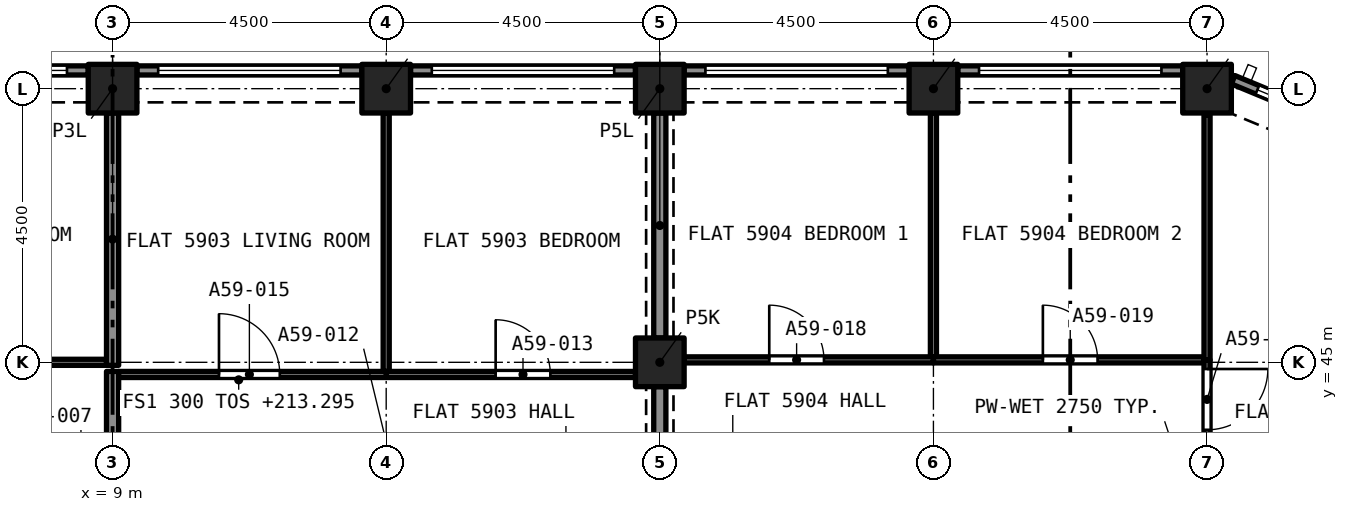
"""IFC4 building model, lengths in metres.
Left out: names, types, materials, properties, quantities, classifications, styles, units other than length and angle.
Written with IfcOpenShell. Run it as: python <this file> out.ifc"""

import sys

from ifc_helpers import new_model, si_unit, direction, frame, frame_2d, origin, origin_2d, place, context, subcontext, project, spatial, rectangle, extrude, element, fill, save


model = new_model("IFC4")
c1 = context("Model", 3, precision=1e-05, world=origin(), true_north=direction((0.0, 1.0)))
c2 = subcontext(c1, "Body", "Model", "MODEL_VIEW")
j1 = project(units=[si_unit("LENGTHUNIT", "METRE"), si_unit("PLANEANGLEUNIT", "RADIAN")], contexts=[c1])
p1 = place(None, origin())
s1 = spatial("IfcSite", under=j1, at=p1, CompositionType="ELEMENT")
p2 = place(p1, origin())
s2 = spatial("IfcBuilding", under=s1, at=p2, CompositionType="ELEMENT")
p3 = place(p2, frame((0.0, 0.0, 213.295)))
s3 = spatial("IfcBuildingStorey", under=s2, at=p3, CompositionType="ELEMENT", Elevation=213.295)
for number, where, z_axis, x_axis in (
    (1, (18.0, 45.0, 0.0), (0.0, 0.0, 1.0), (1.0, 0.0, 0.0)),
    (2, (9.0, 49.5, 0.0), (0.0, 0.0, 1.0), (1.0, 0.0, 0.0)),
    (3, (13.5, 49.5, 0.0), (0.0, 0.0, 1.0), (1.0, 0.0, 0.0)),
    (4, (18.0, 49.5, 0.0), (0.0, 0.0, 1.0), (1.0, 0.0, 0.0)),
    (5, (22.5, 49.5, 0.0), (0.0, 0.0, 1.0), (1.0, 0.0, 0.0)),
    (6, (27.0, 49.5, 0.0), (0.0, 0.0, 1.0), (1.0, 0.0, 0.0)),
):
    element("IfcColumn", number, at=place(p3, frame(where, z_axis=z_axis, x_axis=x_axis)), inside=s3, PredefinedType="COLUMN", context=c2, shape_type="SweptSolid", body=[
        extrude(rectangle(XDim=0.8, YDim=0.8, at=origin_2d()), origin(), (0.0, 0.0, 1.0), 3.2),
    ])
p4 = place(p3, frame((27.429, 49.647, 0.0), z_axis=(0.0, 0.0, 1.0), x_axis=(0.923885342263, -0.382669406082, 0.0)))
e7 = element("IfcWall", 7, at=p4, inside=s3, PredefinedType="SOLIDWALL", context=c2, shape_type="SweptSolid", body=[
    extrude(rectangle(XDim=2.602, YDim=0.15, at=frame_2d((1.301, 0.0))), origin(), (0.0, 0.0, 1.0), 3.2),
])
p5 = place(p4, frame((0.432, 0.0, 0.45)))
e8 = element("IfcOpeningElement", 8, at=p5, cuts=e7, PredefinedType="OPENING", context=c2, shape_type="SweptSolid", body=[
    extrude(rectangle(XDim=1.9, YDim=1.95, at=frame_2d((0.95, 0.975))), frame((0.0, 0.085, 0.0), z_axis=(0.0, -1.0, 0.0), x_axis=(1.0, 0.0, 0.0)), (0.0, 0.0, 1.0), 0.17),
])
p6 = place(p3, frame((22.9, 49.8, 0.0), z_axis=(0.0, 0.0, 1.0), x_axis=(1.0, 0.0, 0.0)))
e9 = element("IfcWall", 9, at=p6, inside=s3, PredefinedType="SOLIDWALL", context=c2, shape_type="SweptSolid", body=[
    extrude(rectangle(XDim=3.7, YDim=0.15, at=frame_2d((1.85, 0.0))), origin(), (0.0, 0.0, 1.0), 3.2),
])
p7 = place(p6, frame((0.35, 0.0, 0.45)))
e10 = element("IfcOpeningElement", 10, at=p7, cuts=e9, PredefinedType="OPENING", context=c2, shape_type="SweptSolid", body=[
    extrude(rectangle(XDim=3.0, YDim=1.95, at=frame_2d((1.5, 0.975))), frame((0.0, 0.085, 0.0), z_axis=(0.0, -1.0, 0.0), x_axis=(1.0, 0.0, 0.0)), (0.0, 0.0, 1.0), 0.17),
])
p8 = place(p3, frame((18.4, 49.8, 0.0), z_axis=(0.0, 0.0, 1.0), x_axis=(1.0, 0.0, 0.0)))
e11 = element("IfcWall", 11, at=p8, inside=s3, PredefinedType="SOLIDWALL", context=c2, shape_type="SweptSolid", body=[
    extrude(rectangle(XDim=3.7, YDim=0.15, at=frame_2d((1.85, 0.0))), origin(), (0.0, 0.0, 1.0), 3.2),
])
p9 = place(p8, frame((0.35, 0.0, 0.45)))
e12 = element("IfcOpeningElement", 12, at=p9, cuts=e11, PredefinedType="OPENING", context=c2, shape_type="SweptSolid", body=[
    extrude(rectangle(XDim=3.0, YDim=1.95, at=frame_2d((1.5, 0.975))), frame((0.0, 0.085, 0.0), z_axis=(0.0, -1.0, 0.0), x_axis=(1.0, 0.0, 0.0)), (0.0, 0.0, 1.0), 0.17),
])
p10 = place(p3, frame((13.9, 49.8, 0.0), z_axis=(0.0, 0.0, 1.0), x_axis=(1.0, 0.0, 0.0)))
e13 = element("IfcWall", 13, at=p10, inside=s3, PredefinedType="SOLIDWALL", context=c2, shape_type="SweptSolid", body=[
    extrude(rectangle(XDim=3.7, YDim=0.15, at=frame_2d((1.85, 0.0))), origin(), (0.0, 0.0, 1.0), 3.2),
])
p11 = place(p10, frame((0.35, 0.0, 0.45)))
e14 = element("IfcOpeningElement", 14, at=p11, cuts=e13, PredefinedType="OPENING", context=c2, shape_type="SweptSolid", body=[
    extrude(rectangle(XDim=3.0, YDim=1.95, at=frame_2d((1.5, 0.975))), frame((0.0, 0.085, 0.0), z_axis=(0.0, -1.0, 0.0), x_axis=(1.0, 0.0, 0.0)), (0.0, 0.0, 1.0), 0.17),
])
p12 = place(p3, frame((9.4, 49.8, 0.0), z_axis=(0.0, 0.0, 1.0), x_axis=(1.0, 0.0, 0.0)))
e15 = element("IfcWall", 15, at=p12, inside=s3, PredefinedType="SOLIDWALL", context=c2, shape_type="SweptSolid", body=[
    extrude(rectangle(XDim=3.7, YDim=0.15, at=frame_2d((1.85, 0.0))), origin(), (0.0, 0.0, 1.0), 3.2),
])
p13 = place(p12, frame((0.35, 0.0, 0.45)))
e16 = element("IfcOpeningElement", 16, at=p13, cuts=e15, PredefinedType="OPENING", context=c2, shape_type="SweptSolid", body=[
    extrude(rectangle(XDim=3.0, YDim=1.95, at=frame_2d((1.5, 0.975))), frame((0.0, 0.085, 0.0), z_axis=(0.0, -1.0, 0.0), x_axis=(1.0, 0.0, 0.0)), (0.0, 0.0, 1.0), 0.17),
])
p14 = place(p3, frame((4.9, 49.8, 0.0), z_axis=(0.0, 0.0, 1.0), x_axis=(1.0, 0.0, 0.0)))
e17 = element("IfcWall", 17, at=p14, inside=s3, PredefinedType="SOLIDWALL", context=c2, shape_type="SweptSolid", body=[
    extrude(rectangle(XDim=3.7, YDim=0.15, at=frame_2d((1.85, 0.0))), origin(), (0.0, 0.0, 1.0), 3.2),
])
p15 = place(p14, frame((0.35, 0.0, 0.45)))
e18 = element("IfcOpeningElement", 18, at=p15, cuts=e17, PredefinedType="OPENING", context=c2, shape_type="SweptSolid", body=[
    extrude(rectangle(XDim=3.0, YDim=1.95, at=frame_2d((1.5, 0.975))), frame((0.0, 0.085, 0.0), z_axis=(0.0, -1.0, 0.0), x_axis=(1.0, 0.0, 0.0)), (0.0, 0.0, 1.0), 0.17),
])
p16 = place(p3, frame((4.5, 45.0, 0.0), z_axis=(0.0, 0.0, 1.0), x_axis=(1.0, 0.0, 0.0)))
e19 = element("IfcWall", 19, at=p16, inside=s3, PredefinedType="PARTITIONING", context=c2, shape_type="SweptSolid", body=[
    extrude(rectangle(XDim=4.4, YDim=0.1, at=frame_2d((2.2, 0.0))), origin(), (0.0, 0.0, 1.0), 2.9),
])
p17 = place(p16, frame((1.8, 0.0, 0.0)))
e20 = element("IfcOpeningElement", 20, at=p17, cuts=e19, PredefinedType="OPENING", context=c2, shape_type="SweptSolid", body=[
    extrude(rectangle(XDim=0.9, YDim=2.1, at=frame_2d((0.45, 1.05))), frame((0.0, 0.06, 0.0), z_axis=(0.0, -1.0, 0.0), x_axis=(1.0, 0.0, 0.0)), (0.0, 0.0, 1.0), 0.12),
])
p18 = place(p3, frame((9.0, 44.95, 0.0), z_axis=(0.0, 0.0, 1.0), x_axis=(0.0, 1.0, 0.0)))
e21 = element("IfcWall", 21, at=p18, inside=s3, PredefinedType="PARTITIONING", context=c2, shape_type="SweptSolid", body=[
    extrude(rectangle(XDim=4.15, YDim=0.2, at=frame_2d((2.075, 0.0))), origin(), (0.0, 0.0, 1.0), 2.9),
])
p19 = place(p3, frame((9.0, 43.62, 0.0), z_axis=(0.0, 0.0, 1.0), x_axis=(0.0, 1.0, 0.0)))
e22 = element("IfcWall", 22, at=p19, inside=s3, PredefinedType="PARTITIONING", context=c2, shape_type="SweptSolid", body=[
    extrude(rectangle(XDim=1.23, YDim=0.2, at=frame_2d((0.615, 0.0))), origin(), (0.0, 0.0, 1.0), 2.9),
])
p20 = place(p3, frame((13.5, 44.8, 0.0), z_axis=(0.0, 0.0, 1.0), x_axis=(1.0, 0.0, 0.0)))
e23 = element("IfcWall", 23, at=p20, inside=s3, PredefinedType="PARTITIONING", context=c2, shape_type="SweptSolid", body=[
    extrude(rectangle(XDim=4.1, YDim=0.1, at=frame_2d((2.05, 0.0))), origin(), (0.0, 0.0, 1.0), 2.9),
])
p21 = place(p20, frame((1.8, 0.0, 0.0)))
e24 = element("IfcOpeningElement", 24, at=p21, cuts=e23, PredefinedType="OPENING", context=c2, shape_type="SweptSolid", body=[
    extrude(rectangle(XDim=0.9, YDim=2.1, at=frame_2d((0.45, 1.05))), frame((0.0, 0.06, 0.0), z_axis=(0.0, -1.0, 0.0), x_axis=(1.0, 0.0, 0.0)), (0.0, 0.0, 1.0), 0.12),
])
p22 = place(p3, frame((13.5, 44.85, 0.0), z_axis=(0.0, 0.0, 1.0), x_axis=(0.0, 1.0, 0.0)))
e25 = element("IfcWall", 25, at=p22, inside=s3, PredefinedType="PARTITIONING", context=c2, shape_type="SweptSolid", body=[
    extrude(rectangle(XDim=4.25, YDim=0.1, at=frame_2d((2.125, 0.0))), origin(), (0.0, 0.0, 1.0), 2.9),
])
p23 = place(p3, frame((18.0, 45.4, 0.0), z_axis=(0.0, 0.0, 1.0), x_axis=(0.0, 1.0, 0.0)))
e26 = element("IfcWall", 26, at=p23, inside=s3, PredefinedType="PARTITIONING", context=c2, shape_type="SweptSolid", body=[
    extrude(rectangle(XDim=3.7, YDim=0.2, at=frame_2d((1.85, 0.0))), origin(), (0.0, 0.0, 1.0), 2.38),
])
p24 = place(p3, frame((9.1, 44.8, 0.0), z_axis=(0.0, 0.0, 1.0), x_axis=(1.0, 0.0, 0.0)))
e27 = element("IfcWall", 27, at=p24, inside=s3, PredefinedType="PARTITIONING", context=c2, shape_type="SweptSolid", body=[
    extrude(rectangle(XDim=4.4, YDim=0.1, at=frame_2d((2.2, 0.0))), origin(), (0.0, 0.0, 1.0), 2.9),
])
p25 = place(p24, frame((1.65, 0.0, 0.0)))
e28 = element("IfcOpeningElement", 28, at=p25, cuts=e27, PredefinedType="OPENING", context=c2, shape_type="SweptSolid", body=[
    extrude(rectangle(XDim=1.0, YDim=2.1, at=frame_2d((0.5, 1.05))), frame((0.0, 0.06, 0.0), z_axis=(0.0, -1.0, 0.0), x_axis=(1.0, 0.0, 0.0)), (0.0, 0.0, 1.0), 0.12),
])
p26 = place(p3, frame((18.0, 40.9, 0.0), z_axis=(0.0, 0.0, 1.0), x_axis=(0.0, 1.0, 0.0)))
e29 = element("IfcWall", 29, at=p26, inside=s3, PredefinedType="PARTITIONING", context=c2, shape_type="SweptSolid", body=[
    extrude(rectangle(XDim=3.7, YDim=0.2, at=frame_2d((1.85, 0.0))), origin(), (0.0, 0.0, 1.0), 2.38),
])
p27 = place(p3, frame((22.5, 45.09, 0.0), z_axis=(0.0, 0.0, 1.0), x_axis=(0.0, 1.0, 0.0)))
e30 = element("IfcWall", 30, at=p27, inside=s3, PredefinedType="PARTITIONING", context=c2, shape_type="SweptSolid", body=[
    extrude(rectangle(XDim=4.01, YDim=0.1, at=frame_2d((2.005, 0.0))), origin(), (0.0, 0.0, 1.0), 2.75),
])
p28 = place(p3, frame((18.4, 45.04, 0.0), z_axis=(0.0, 0.0, 1.0), x_axis=(1.0, 0.0, 0.0)))
e31 = element("IfcWall", 31, at=p28, inside=s3, PredefinedType="PARTITIONING", context=c2, shape_type="SweptSolid", body=[
    extrude(rectangle(XDim=4.1, YDim=0.1, at=frame_2d((2.05, 0.0))), origin(), (0.0, 0.0, 1.0), 2.75),
])
p29 = place(p28, frame((1.4, 0.0, 0.0)))
e32 = element("IfcOpeningElement", 32, at=p29, cuts=e31, PredefinedType="OPENING", context=c2, shape_type="SweptSolid", body=[
    extrude(rectangle(XDim=0.9, YDim=2.1, at=frame_2d((0.45, 1.05))), frame((0.0, 0.06, 0.0), z_axis=(0.0, -1.0, 0.0), x_axis=(1.0, 0.0, 0.0)), (0.0, 0.0, 1.0), 0.12),
])
p30 = place(p3, frame((22.5, 45.04, 0.0), z_axis=(0.0, 0.0, 1.0), x_axis=(1.0, 0.0, 0.0)))
e33 = element("IfcWall", 33, at=p30, inside=s3, PredefinedType="PARTITIONING", context=c2, shape_type="SweptSolid", body=[
    extrude(rectangle(XDim=4.45, YDim=0.1, at=frame_2d((2.225, 0.0))), origin(), (0.0, 0.0, 1.0), 2.75),
])
p31 = place(p30, frame((1.8, 0.0, 0.0)))
e34 = element("IfcOpeningElement", 34, at=p31, cuts=e33, PredefinedType="OPENING", context=c2, shape_type="SweptSolid", body=[
    extrude(rectangle(XDim=0.9, YDim=2.1, at=frame_2d((0.45, 1.05))), frame((0.0, 0.06, 0.0), z_axis=(0.0, -1.0, 0.0), x_axis=(1.0, 0.0, 0.0)), (0.0, 0.0, 1.0), 0.12),
])
p32 = place(p3, frame((27.0, 45.04, 0.0), z_axis=(0.0, 0.0, 1.0), x_axis=(0.0, 1.0, 0.0)))
e35 = element("IfcWall", 35, at=p32, inside=s3, PredefinedType="PARTITIONING", context=c2, shape_type="SweptSolid", body=[
    extrude(rectangle(XDim=4.027, YDim=0.1, at=frame_2d((2.014, 0.0))), origin(), (0.0, 0.0, 1.0), 2.75),
])
p33 = place(p3, frame((27.0, 45.04, 0.0), z_axis=(0.0, 0.0, 1.0), x_axis=(0.0, -1.0, 0.0)))
e36 = element("IfcWall", 36, at=p33, inside=s3, PredefinedType="PARTITIONING", context=c2, shape_type="SweptSolid", body=[
    extrude(rectangle(XDim=1.3, YDim=0.1, at=frame_2d((0.65, 0.0))), origin(), (0.0, 0.0, 1.0), 2.75),
])
p34 = place(p33, frame((0.15, 0.0, 0.0)))
e37 = element("IfcOpeningElement", 37, at=p34, cuts=e36, PredefinedType="OPENING", context=c2, shape_type="SweptSolid", body=[
    extrude(rectangle(XDim=1.0, YDim=2.1, at=frame_2d((0.5, 1.05))), frame((0.0, 0.06, 0.0), z_axis=(0.0, -1.0, 0.0), x_axis=(1.0, 0.0, 0.0)), (0.0, 0.0, 1.0), 0.12),
])
p35 = place(p5, origin())
e38 = element("IfcWindow", 38, at=p35, inside=s3, PartitioningType="SINGLE_PANEL", PredefinedType="WINDOW", context=c2, shape_type="SweptSolid", body=[
    extrude(rectangle(XDim=1.9, YDim=1.95, at=frame_2d((0.95, 0.975))), frame((0.0, 0.03, 0.0), z_axis=(0.0, -1.0, 0.0), x_axis=(1.0, 0.0, 0.0)), (0.0, 0.0, 1.0), 0.06),
])
fill(e8, e38)
p36 = place(p7, origin())
e39 = element("IfcWindow", 39, at=p36, inside=s3, PartitioningType="SINGLE_PANEL", PredefinedType="WINDOW", context=c2, shape_type="SweptSolid", body=[
    extrude(rectangle(XDim=3.0, YDim=1.95, at=frame_2d((1.5, 0.975))), frame((0.0, 0.03, 0.0), z_axis=(0.0, -1.0, 0.0), x_axis=(1.0, 0.0, 0.0)), (0.0, 0.0, 1.0), 0.06),
])
fill(e10, e39)
p37 = place(p9, origin())
e40 = element("IfcWindow", 40, at=p37, inside=s3, PartitioningType="SINGLE_PANEL", PredefinedType="WINDOW", context=c2, shape_type="SweptSolid", body=[
    extrude(rectangle(XDim=3.0, YDim=1.95, at=frame_2d((1.5, 0.975))), frame((0.0, 0.03, 0.0), z_axis=(0.0, -1.0, 0.0), x_axis=(1.0, 0.0, 0.0)), (0.0, 0.0, 1.0), 0.06),
])
fill(e12, e40)
p38 = place(p11, origin())
e41 = element("IfcWindow", 41, at=p38, inside=s3, PartitioningType="SINGLE_PANEL", PredefinedType="WINDOW", context=c2, shape_type="SweptSolid", body=[
    extrude(rectangle(XDim=3.0, YDim=1.95, at=frame_2d((1.5, 0.975))), frame((0.0, 0.03, 0.0), z_axis=(0.0, -1.0, 0.0), x_axis=(1.0, 0.0, 0.0)), (0.0, 0.0, 1.0), 0.06),
])
fill(e14, e41)
p39 = place(p13, origin())
e42 = element("IfcWindow", 42, at=p39, inside=s3, PartitioningType="SINGLE_PANEL", PredefinedType="WINDOW", context=c2, shape_type="SweptSolid", body=[
    extrude(rectangle(XDim=3.0, YDim=1.95, at=frame_2d((1.5, 0.975))), frame((0.0, 0.03, 0.0), z_axis=(0.0, -1.0, 0.0), x_axis=(1.0, 0.0, 0.0)), (0.0, 0.0, 1.0), 0.06),
])
fill(e16, e42)
p40 = place(p15, origin())
e43 = element("IfcWindow", 43, at=p40, inside=s3, PartitioningType="SINGLE_PANEL", PredefinedType="WINDOW", context=c2, shape_type="SweptSolid", body=[
    extrude(rectangle(XDim=3.0, YDim=1.95, at=frame_2d((1.5, 0.975))), frame((0.0, 0.03, 0.0), z_axis=(0.0, -1.0, 0.0), x_axis=(1.0, 0.0, 0.0)), (0.0, 0.0, 1.0), 0.06),
])
fill(e18, e43)
p41 = place(p21, origin())
e44 = element("IfcDoor", 44, at=p41, inside=s3, OperationType="SINGLE_SWING_RIGHT", PredefinedType="DOOR", context=c2, shape_type="SweptSolid", body=[
    extrude(rectangle(XDim=0.9, YDim=2.1, at=frame_2d((0.45, 1.05))), frame((0.0, 0.025, 0.0), z_axis=(0.0, -1.0, 0.0), x_axis=(1.0, 0.0, 0.0)), (0.0, 0.0, 1.0), 0.05),
])
fill(e24, e44)
p42 = place(p25, origin())
e45 = element("IfcDoor", 45, at=p42, inside=s3, OperationType="SINGLE_SWING_LEFT", PredefinedType="DOOR", context=c2, shape_type="SweptSolid", body=[
    extrude(rectangle(XDim=1.0, YDim=2.1, at=frame_2d((0.5, 1.05))), frame((0.0, 0.025, 0.0), z_axis=(0.0, -1.0, 0.0), x_axis=(1.0, 0.0, 0.0)), (0.0, 0.0, 1.0), 0.05),
])
fill(e28, e45)
p43 = place(p29, origin())
e46 = element("IfcDoor", 46, at=p43, inside=s3, OperationType="SINGLE_SWING_LEFT", PredefinedType="DOOR", context=c2, shape_type="SweptSolid", body=[
    extrude(rectangle(XDim=0.9, YDim=2.1, at=frame_2d((0.45, 1.05))), frame((0.0, 0.025, 0.0), z_axis=(0.0, -1.0, 0.0), x_axis=(1.0, 0.0, 0.0)), (0.0, 0.0, 1.0), 0.05),
])
fill(e32, e46)
p44 = place(p31, origin())
e47 = element("IfcDoor", 47, at=p44, inside=s3, OperationType="SINGLE_SWING_RIGHT", PredefinedType="DOOR", context=c2, shape_type="SweptSolid", body=[
    extrude(rectangle(XDim=0.9, YDim=2.1, at=frame_2d((0.45, 1.05))), frame((0.0, 0.025, 0.0), z_axis=(0.0, -1.0, 0.0), x_axis=(1.0, 0.0, 0.0)), (0.0, 0.0, 1.0), 0.05),
])
fill(e34, e47)
p45 = place(p34, origin())
e48 = element("IfcDoor", 48, at=p45, inside=s3, OperationType="SINGLE_SWING_RIGHT", PredefinedType="DOOR", context=c2, shape_type="SweptSolid", body=[
    extrude(rectangle(XDim=1.0, YDim=2.1, at=frame_2d((0.5, 1.05))), frame((0.0, 0.025, 0.0), z_axis=(0.0, -1.0, 0.0), x_axis=(1.0, 0.0, 0.0)), (0.0, 0.0, 1.0), 0.05),
])
fill(e37, e48)
save(model, sys.argv[1])
